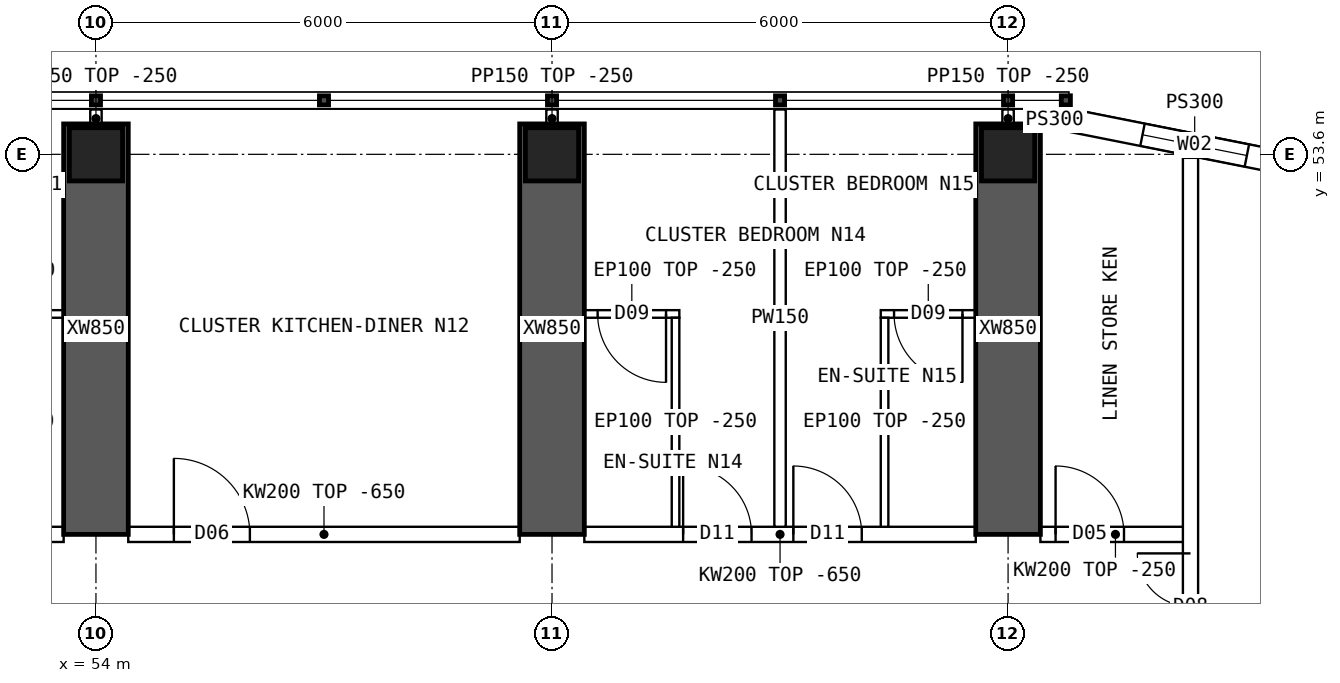
"""IFC4 building model, lengths in metres.
Left out: names, types, materials, properties, quantities, classifications, styles, units other than length and angle.
Written with IfcOpenShell. Run it as: python <this file> out.ifc"""

import sys

from ifc_helpers import new_model, si_unit, direction, frame, frame_2d, origin, origin_2d, place, context, subcontext, project, spatial, polyline, rectangle, hollow_rectangle, outline, extrude, element, fill, save


model = new_model("IFC4")
c1 = context("Model", 3, precision=1e-05, world=origin(), true_north=direction((0.0, 1.0)))
c2 = subcontext(c1, "Body", "Model", "MODEL_VIEW")
j1 = project(units=[si_unit("LENGTHUNIT", "METRE"), si_unit("PLANEANGLEUNIT", "RADIAN")], contexts=[c1])
p1 = place(None, origin())
s1 = spatial("IfcSite", under=j1, at=p1, CompositionType="ELEMENT")
p2 = place(p1, origin())
s2 = spatial("IfcBuilding", under=s1, at=p2, CompositionType="ELEMENT")
p3 = place(p2, frame((0.0, 0.0, 171.1)))
s3 = spatial("IfcBuildingStorey", under=s2, at=p3, CompositionType="ELEMENT", Elevation=171.1)
for number, where, z_axis, x_axis in (
    (1, (54.0, 53.6, 0.0), (0.0, 0.0, 1.0), (1.0, 0.0, 0.0)),
    (2, (60.0, 53.6, 0.0), (0.0, 0.0, 1.0), (1.0, 0.0, 0.0)),
    (3, (66.0, 53.6, 0.0), (0.0, 0.0, 1.0), (1.0, 0.0, 0.0)),
):
    element("IfcColumn", number, at=place(p3, frame(where, z_axis=z_axis, x_axis=x_axis)), inside=s3, PredefinedType="COLUMN", context=c2, shape_type="SweptSolid", body=[
        extrude(hollow_rectangle(XDim=0.7, YDim=0.7, WallThickness=0.07, at=origin_2d()), origin(), (0.0, 0.0, 1.0), 3.75),
    ])
for number, where, z_axis, x_axis in (
    (4, (54.0, 48.6, 0.0), (0.0, 0.0, 1.0), (0.0, 1.0, 0.0)),
    (5, (60.0, 48.6, 0.0), (0.0, 0.0, 1.0), (0.0, 1.0, 0.0)),
    (6, (66.0, 48.6, 0.0), (0.0, 0.0, 1.0), (0.0, 1.0, 0.0)),
):
    element("IfcWall", number, at=place(p3, frame(where, z_axis=z_axis, x_axis=x_axis)), inside=s3, PredefinedType="SHEAR", context=c2, shape_type="SweptSolid", body=[
        extrude(rectangle(XDim=5.4, YDim=0.85, at=frame_2d((2.7, 0.0))), origin(), (0.0, 0.0, 1.0), 3.75),
    ])
p4 = place(p3, frame((70.11, 53.392, 0.0), z_axis=(0.0, 0.0, 1.0), x_axis=(-0.98078325777, 0.195100490205, 0.0)))
e7 = element("IfcWall", 7, at=p4, inside=s3, PredefinedType="SOLIDWALL", context=c2, shape_type="SweptSolid", body=[
    extrude(outline(polyline([(-0.03, -0.15), (3.405, -0.15), (3.345, 0.15), (0.03, 0.15), (-0.03, -0.15)])), origin(), (0.0, 0.0, 1.0), 3.5),
])
p5 = place(p4, frame((0.988, 0.0, 0.9)))
e8 = element("IfcOpeningElement", 8, at=p5, cuts=e7, PredefinedType="OPENING", context=c2, shape_type="SweptSolid", body=[
    extrude(rectangle(XDim=1.4, YDim=1.8, at=frame_2d((0.7, 0.9))), frame((0.0, 0.16, 0.0), z_axis=(0.0, -1.0, 0.0), x_axis=(1.0, 0.0, 0.0)), (0.0, 0.0, 1.0), 0.32),
])
p6 = place(p3, frame((66.8, 54.05, 0.0), z_axis=(0.0, 0.0, 1.0), x_axis=(-1.0, 0.0, 0.0)))
e9 = element("IfcWall", 9, at=p6, inside=s3, PredefinedType="SOLIDWALL", context=c2, shape_type="SweptSolid", body=[
    extrude(rectangle(XDim=0.375, YDim=0.3, at=frame_2d((0.188, 0.0))), origin(), (0.0, 0.0, 1.0), 3.5),
])
p7 = place(p3, frame((48.425, 48.6, 0.0), z_axis=(0.0, 0.0, 1.0), x_axis=(1.0, 0.0, 0.0)))
e10 = element("IfcWall", 10, at=p7, inside=s3, PredefinedType="SOLIDWALL", context=c2, shape_type="SweptSolid", body=[
    extrude(outline(polyline([(0.0, 0.0), (5.15, 0.0), (5.15, 3.1), (0.0, 3.1), (0.0, 0.0)])), frame((0.0, 0.1, 0.0), z_axis=(0.0, -1.0, 0.0), x_axis=(1.0, 0.0, 0.0)), (0.0, 0.0, 1.0), 0.2),
])
p8 = place(p7, frame((1.3, 0.0, 0.0)))
e11 = element("IfcOpeningElement", 11, at=p8, cuts=e10, PredefinedType="OPENING", context=c2, shape_type="SweptSolid", body=[
    extrude(rectangle(XDim=0.9, YDim=2.1, at=frame_2d((0.45, 1.05))), frame((0.0, 0.11, 0.0), z_axis=(0.0, -1.0, 0.0), x_axis=(1.0, 0.0, 0.0)), (0.0, 0.0, 1.0), 0.22),
])
p9 = place(p7, frame((2.75, 0.0, 0.0)))
e12 = element("IfcOpeningElement", 12, at=p9, cuts=e10, PredefinedType="OPENING", context=c2, shape_type="SweptSolid", body=[
    extrude(rectangle(XDim=0.9, YDim=2.1, at=frame_2d((0.45, 1.05))), frame((0.0, 0.11, 0.0), z_axis=(0.0, -1.0, 0.0), x_axis=(1.0, 0.0, 0.0)), (0.0, 0.0, 1.0), 0.22),
])
p10 = place(p3, frame((54.425, 48.6, 0.0), z_axis=(0.0, 0.0, 1.0), x_axis=(1.0, 0.0, 0.0)))
e13 = element("IfcWall", 13, at=p10, inside=s3, PredefinedType="SOLIDWALL", context=c2, shape_type="SweptSolid", body=[
    extrude(outline(polyline([(0.0, 0.0), (5.15, 0.0), (5.15, 3.1), (0.0, 3.1), (0.0, 0.0)])), frame((0.0, 0.1, 0.0), z_axis=(0.0, -1.0, 0.0), x_axis=(1.0, 0.0, 0.0)), (0.0, 0.0, 1.0), 0.2),
])
p11 = place(p10, frame((0.6, 0.0, 0.0)))
e14 = element("IfcOpeningElement", 14, at=p11, cuts=e13, PredefinedType="OPENING", context=c2, shape_type="SweptSolid", body=[
    extrude(rectangle(XDim=1.0, YDim=2.1, at=frame_2d((0.5, 1.05))), frame((0.0, 0.11, 0.0), z_axis=(0.0, -1.0, 0.0), x_axis=(1.0, 0.0, 0.0)), (0.0, 0.0, 1.0), 0.22),
])
p12 = place(p3, frame((60.425, 48.6, 0.0), z_axis=(0.0, 0.0, 1.0), x_axis=(1.0, 0.0, 0.0)))
e15 = element("IfcWall", 15, at=p12, inside=s3, PredefinedType="SOLIDWALL", context=c2, shape_type="SweptSolid", body=[
    extrude(outline(polyline([(0.0, 0.0), (5.15, 0.0), (5.15, 3.1), (0.0, 3.1), (0.0, 0.0)])), frame((0.0, 0.1, 0.0), z_axis=(0.0, -1.0, 0.0), x_axis=(1.0, 0.0, 0.0)), (0.0, 0.0, 1.0), 0.2),
])
p13 = place(p12, frame((1.3, 0.0, 0.0)))
e16 = element("IfcOpeningElement", 16, at=p13, cuts=e15, PredefinedType="OPENING", context=c2, shape_type="SweptSolid", body=[
    extrude(rectangle(XDim=0.9, YDim=2.1, at=frame_2d((0.45, 1.05))), frame((0.0, 0.11, 0.0), z_axis=(0.0, -1.0, 0.0), x_axis=(1.0, 0.0, 0.0)), (0.0, 0.0, 1.0), 0.22),
])
p14 = place(p12, frame((2.75, 0.0, 0.0)))
e17 = element("IfcOpeningElement", 17, at=p14, cuts=e15, PredefinedType="OPENING", context=c2, shape_type="SweptSolid", body=[
    extrude(rectangle(XDim=0.9, YDim=2.1, at=frame_2d((0.45, 1.05))), frame((0.0, 0.11, 0.0), z_axis=(0.0, -1.0, 0.0), x_axis=(1.0, 0.0, 0.0)), (0.0, 0.0, 1.0), 0.22),
])
p15 = place(p3, frame((66.425, 48.6, 0.0), z_axis=(0.0, 0.0, 1.0), x_axis=(1.0, 0.0, 0.0)))
e18 = element("IfcWall", 18, at=p15, inside=s3, PredefinedType="SOLIDWALL", context=c2, shape_type="SweptSolid", body=[
    extrude(rectangle(XDim=1.975, YDim=0.2, at=frame_2d((0.987, 0.0))), origin(), (0.0, 0.0, 1.0), 3.5),
])
p16 = place(p15, frame((0.2, 0.0, 0.0)))
e19 = element("IfcOpeningElement", 19, at=p16, cuts=e18, PredefinedType="OPENING", context=c2, shape_type="SweptSolid", body=[
    extrude(rectangle(XDim=0.9, YDim=2.1, at=frame_2d((0.45, 1.05))), frame((0.0, 0.11, 0.0), z_axis=(0.0, -1.0, 0.0), x_axis=(1.0, 0.0, 0.0)), (0.0, 0.0, 1.0), 0.22),
])
p17 = place(p3, frame((52.325, 51.5, 0.0), z_axis=(0.0, 0.0, 1.0), x_axis=(1.0, 0.0, 0.0)))
e20 = element("IfcWall", 20, at=p17, inside=s3, PredefinedType="PARTITIONING", context=c2, shape_type="SweptSolid", body=[
    extrude(rectangle(XDim=1.25, YDim=0.1, at=frame_2d((0.625, 0.0))), origin(), (0.0, 0.0, 1.0), 3.5),
])
p18 = place(p17, frame((0.175, 0.0, 0.0)))
e21 = element("IfcOpeningElement", 21, at=p18, cuts=e20, PredefinedType="OPENING", context=c2, shape_type="SweptSolid", body=[
    extrude(rectangle(XDim=0.9, YDim=2.1, at=frame_2d((0.45, 1.05))), frame((0.0, 0.06, 0.0), z_axis=(0.0, -1.0, 0.0), x_axis=(1.0, 0.0, 0.0)), (0.0, 0.0, 1.0), 0.12),
])
p19 = place(p3, frame((63.0, 54.19, 0.0), z_axis=(0.0, 0.0, 1.0), x_axis=(0.0, -1.0, 0.0)))
e22 = element("IfcWall", 22, at=p19, inside=s3, PredefinedType="PARTITIONING", context=c2, shape_type="SweptSolid", body=[
    extrude(outline(polyline([(0.0, 0.0), (5.49, 0.0), (5.49, 3.1), (5.442, 3.1), (5.44, 3.5), (0.792, 3.5), (0.79, 3.1), (0.392, 3.1), (0.39, 3.5), (0.0, 3.5), (0.0, 0.0)])), frame((0.0, 0.075, 0.0), z_axis=(0.0, -1.0, 0.0), x_axis=(1.0, 0.0, 0.0)), (0.0, 0.0, 1.0), 0.15),
])
p20 = place(p3, frame((60.425, 51.5, 0.0), z_axis=(0.0, 0.0, 1.0), x_axis=(1.0, 0.0, 0.0)))
e23 = element("IfcWall", 23, at=p20, inside=s3, PredefinedType="PARTITIONING", context=c2, shape_type="SweptSolid", body=[
    extrude(rectangle(XDim=1.25, YDim=0.1, at=frame_2d((0.625, 0.0))), origin(), (0.0, 0.0, 1.0), 3.5),
])
p21 = place(p20, frame((0.175, 0.0, 0.0)))
e24 = element("IfcOpeningElement", 24, at=p21, cuts=e23, PredefinedType="OPENING", context=c2, shape_type="SweptSolid", body=[
    extrude(rectangle(XDim=0.9, YDim=2.1, at=frame_2d((0.45, 1.05))), frame((0.0, 0.06, 0.0), z_axis=(0.0, -1.0, 0.0), x_axis=(1.0, 0.0, 0.0)), (0.0, 0.0, 1.0), 0.12),
])
p22 = place(p3, frame((61.625, 51.45, 0.0), z_axis=(0.0, 0.0, 1.0), x_axis=(0.0, -1.0, 0.0)))
e25 = element("IfcWall", 25, at=p22, inside=s3, PredefinedType="PARTITIONING", context=c2, shape_type="SweptSolid", body=[
    extrude(outline(polyline([(0.0, 0.0), (2.75, 0.0), (2.75, 3.1), (2.702, 3.1), (2.7, 3.5), (0.0, 3.5), (0.0, 0.0)])), frame((0.0, 0.05, 0.0), z_axis=(0.0, -1.0, 0.0), x_axis=(1.0, 0.0, 0.0)), (0.0, 0.0, 1.0), 0.1),
])
p23 = place(p3, frame((64.325, 51.5, 0.0), z_axis=(0.0, 0.0, 1.0), x_axis=(1.0, 0.0, 0.0)))
e26 = element("IfcWall", 26, at=p23, inside=s3, PredefinedType="PARTITIONING", context=c2, shape_type="SweptSolid", body=[
    extrude(rectangle(XDim=1.25, YDim=0.1, at=frame_2d((0.625, 0.0))), origin(), (0.0, 0.0, 1.0), 3.5),
])
p24 = place(p23, frame((0.175, 0.0, 0.0)))
e27 = element("IfcOpeningElement", 27, at=p24, cuts=e26, PredefinedType="OPENING", context=c2, shape_type="SweptSolid", body=[
    extrude(rectangle(XDim=0.9, YDim=2.1, at=frame_2d((0.45, 1.05))), frame((0.0, 0.06, 0.0), z_axis=(0.0, -1.0, 0.0), x_axis=(1.0, 0.0, 0.0)), (0.0, 0.0, 1.0), 0.12),
])
p25 = place(p3, frame((64.375, 51.45, 0.0), z_axis=(0.0, 0.0, 1.0), x_axis=(0.0, -1.0, 0.0)))
e28 = element("IfcWall", 28, at=p25, inside=s3, PredefinedType="PARTITIONING", context=c2, shape_type="SweptSolid", body=[
    extrude(outline(polyline([(0.0, 0.0), (2.75, 0.0), (2.75, 3.1), (2.702, 3.1), (2.7, 3.5), (0.0, 3.5), (0.0, 0.0)])), frame((0.0, 0.05, 0.0), z_axis=(0.0, -1.0, 0.0), x_axis=(1.0, 0.0, 0.0)), (0.0, 0.0, 1.0), 0.1),
])
p26 = place(p3, frame((68.4, 10.446, 0.0), z_axis=(0.0, 0.0, 1.0), x_axis=(0.0, 1.0, 0.0)))
e29 = element("IfcWall", 29, at=p26, inside=s3, PredefinedType="SOLIDWALL", context=c2, shape_type="SweptSolid", body=[
    extrude(rectangle(XDim=43.107, YDim=0.2, at=frame_2d((21.554, 0.0))), origin(), (0.0, 0.0, 1.0), 3.5),
])
p27 = place(p26, frame((13.914, 0.0, 0.0)))
e30 = element("IfcOpeningElement", 30, at=p27, cuts=e29, PredefinedType="OPENING", context=c2, shape_type="SweptSolid", body=[
    extrude(rectangle(XDim=1.2, YDim=2.1, at=frame_2d((0.6, 1.05))), frame((0.0, 0.11, 0.0), z_axis=(0.0, -1.0, 0.0), x_axis=(1.0, 0.0, 0.0)), (0.0, 0.0, 1.0), 0.22),
])
p28 = place(p26, frame((22.634, 0.0, 0.0)))
e31 = element("IfcOpeningElement", 31, at=p28, cuts=e29, PredefinedType="OPENING", context=c2, shape_type="SweptSolid", body=[
    extrude(rectangle(XDim=1.2, YDim=2.1, at=frame_2d((0.6, 1.05))), frame((0.0, 0.11, 0.0), z_axis=(0.0, -1.0, 0.0), x_axis=(1.0, 0.0, 0.0)), (0.0, 0.0, 1.0), 0.22),
])
p29 = place(p26, frame((5.104, 0.0, 0.0)))
e32 = element("IfcOpeningElement", 32, at=p29, cuts=e29, PredefinedType="OPENING", context=c2, shape_type="SweptSolid", body=[
    extrude(rectangle(XDim=1.4, YDim=2.1, at=frame_2d((0.7, 1.05))), frame((0.0, 0.11, 0.0), z_axis=(0.0, -1.0, 0.0), x_axis=(1.0, 0.0, 0.0)), (0.0, 0.0, 1.0), 0.22),
])
p30 = place(p26, frame((36.504, 0.0, 0.0)))
e33 = element("IfcOpeningElement", 33, at=p30, cuts=e29, PredefinedType="OPENING", context=c2, shape_type="SweptSolid", body=[
    extrude(rectangle(XDim=1.4, YDim=2.1, at=frame_2d((0.7, 1.05))), frame((0.0, 0.11, 0.0), z_axis=(0.0, -1.0, 0.0), x_axis=(1.0, 0.0, 0.0)), (0.0, 0.0, 1.0), 0.22),
])
for number, where, z_axis, x_axis in (
    (34, (54.0, 53.95, 0.0), (0.0, 0.0, 1.0), (0.0, 1.0, 0.0)),
    (35, (60.0, 53.95, 0.0), (0.0, 0.0, 1.0), (0.0, 1.0, 0.0)),
    (36, (66.0, 53.95, 0.0), (0.0, 0.0, 1.0), (0.0, 1.0, 0.0)),
):
    element("IfcWall", number, at=place(p3, frame(where, z_axis=z_axis, x_axis=x_axis)), inside=s3, PredefinedType="PARTITIONING", context=c2, shape_type="SweptSolid", body=[
        extrude(rectangle(XDim=0.24, YDim=0.15, at=frame_2d((0.12, 0.0))), origin(), (0.0, 0.0, 1.0), 3.5),
    ])
p31 = place(p5, origin())
e37 = element("IfcWindow", 37, at=p31, inside=s3, PartitioningType="SINGLE_PANEL", PredefinedType="WINDOW", context=c2, shape_type="SweptSolid", body=[
    extrude(rectangle(XDim=1.4, YDim=1.8, at=frame_2d((0.7, 0.9))), frame((0.0, 0.03, 0.0), z_axis=(0.0, -1.0, 0.0), x_axis=(1.0, 0.0, 0.0)), (0.0, 0.0, 1.0), 0.06),
])
fill(e8, e37)
p32 = place(p11, origin())
e38 = element("IfcDoor", 38, at=p32, inside=s3, OperationType="SINGLE_SWING_LEFT", PredefinedType="DOOR", context=c2, shape_type="SweptSolid", body=[
    extrude(rectangle(XDim=1.0, YDim=2.1, at=frame_2d((0.5, 1.05))), frame((0.0, 0.025, 0.0), z_axis=(0.0, -1.0, 0.0), x_axis=(1.0, 0.0, 0.0)), (0.0, 0.0, 1.0), 0.05),
])
fill(e14, e38)
p33 = place(p21, origin())
e39 = element("IfcDoor", 39, at=p33, inside=s3, OperationType="SINGLE_SWING_RIGHT", PredefinedType="DOOR", context=c2, shape_type="SweptSolid", body=[
    extrude(rectangle(XDim=0.9, YDim=2.1, at=frame_2d((0.45, 1.05))), frame((0.0, 0.025, 0.0), z_axis=(0.0, -1.0, 0.0), x_axis=(1.0, 0.0, 0.0)), (0.0, 0.0, 1.0), 0.05),
])
fill(e24, e39)
p34 = place(p13, origin())
e40 = element("IfcDoor", 40, at=p34, inside=s3, OperationType="SINGLE_SWING_LEFT", PredefinedType="DOOR", context=c2, shape_type="SweptSolid", body=[
    extrude(rectangle(XDim=0.9, YDim=2.1, at=frame_2d((0.45, 1.05))), frame((0.0, 0.025, 0.0), z_axis=(0.0, -1.0, 0.0), x_axis=(1.0, 0.0, 0.0)), (0.0, 0.0, 1.0), 0.05),
])
fill(e16, e40)
p35 = place(p24, origin())
e41 = element("IfcDoor", 41, at=p35, inside=s3, OperationType="SINGLE_SWING_RIGHT", PredefinedType="DOOR", context=c2, shape_type="SweptSolid", body=[
    extrude(rectangle(XDim=0.9, YDim=2.1, at=frame_2d((0.45, 1.05))), frame((0.0, 0.025, 0.0), z_axis=(0.0, -1.0, 0.0), x_axis=(1.0, 0.0, 0.0)), (0.0, 0.0, 1.0), 0.05),
])
fill(e27, e41)
p36 = place(p14, origin())
e42 = element("IfcDoor", 42, at=p36, inside=s3, OperationType="SINGLE_SWING_LEFT", PredefinedType="DOOR", context=c2, shape_type="SweptSolid", body=[
    extrude(rectangle(XDim=0.9, YDim=2.1, at=frame_2d((0.45, 1.05))), frame((0.0, 0.025, 0.0), z_axis=(0.0, -1.0, 0.0), x_axis=(1.0, 0.0, 0.0)), (0.0, 0.0, 1.0), 0.05),
])
fill(e17, e42)
p37 = place(p30, origin())
e43 = element("IfcDoor", 43, at=p37, inside=s3, OperationType="DOUBLE_DOOR_SINGLE_SWING", PredefinedType="DOOR", context=c2, shape_type="SweptSolid", body=[
    extrude(rectangle(XDim=1.4, YDim=2.1, at=frame_2d((0.7, 1.05))), frame((0.0, 0.025, 0.0), z_axis=(0.0, -1.0, 0.0), x_axis=(1.0, 0.0, 0.0)), (0.0, 0.0, 1.0), 0.05),
])
fill(e33, e43)
p38 = place(p16, origin())
e44 = element("IfcDoor", 44, at=p38, inside=s3, OperationType="SINGLE_SWING_LEFT", PredefinedType="DOOR", context=c2, shape_type="SweptSolid", body=[
    extrude(rectangle(XDim=0.9, YDim=2.1, at=frame_2d((0.45, 1.05))), frame((0.0, 0.025, 0.0), z_axis=(0.0, -1.0, 0.0), x_axis=(1.0, 0.0, 0.0)), (0.0, 0.0, 1.0), 0.05),
])
fill(e19, e44)
save(model, sys.argv[1])
